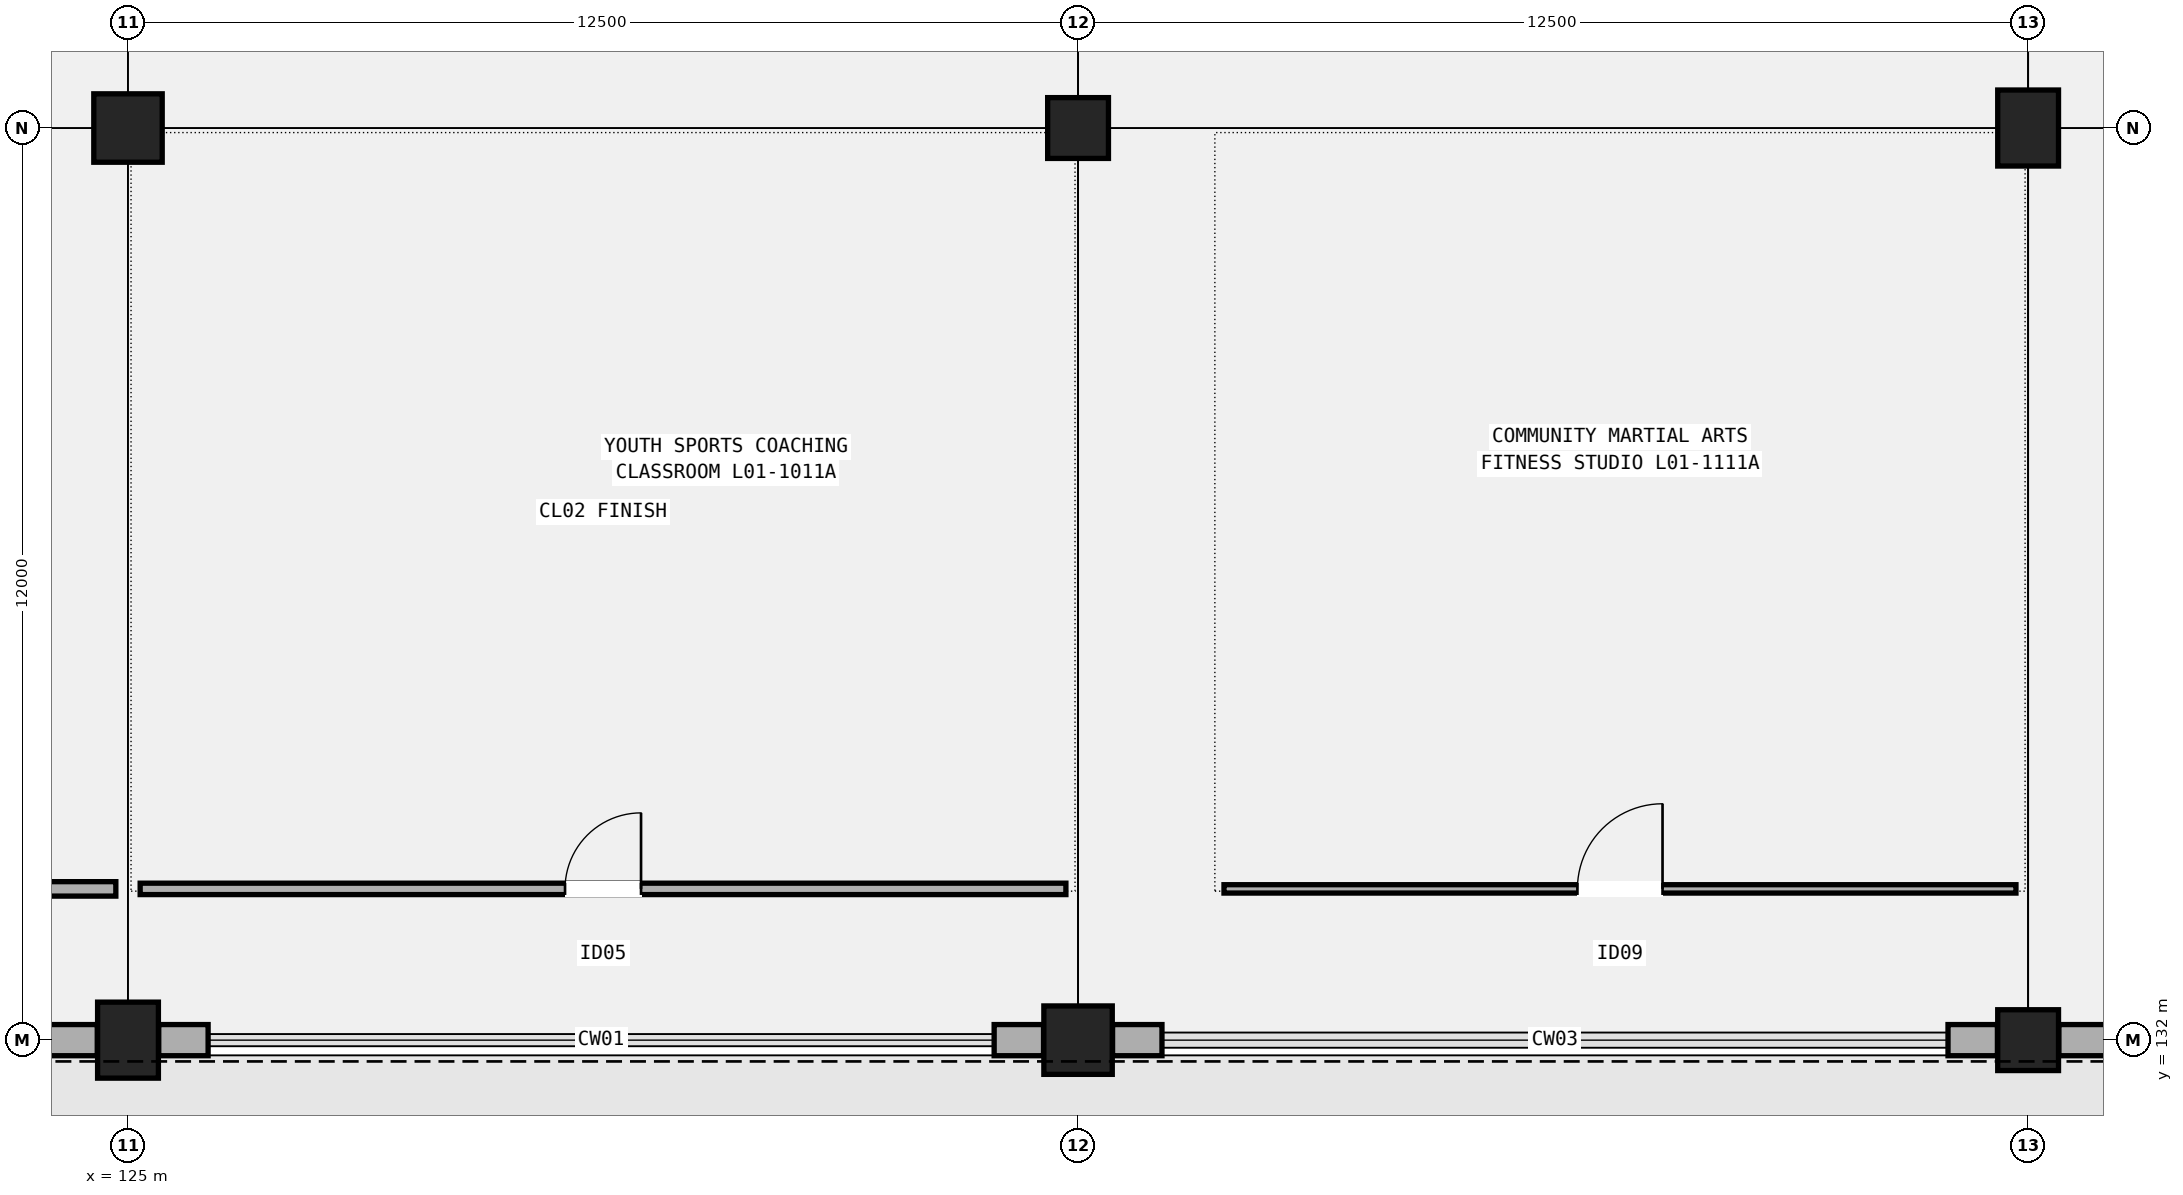
"""IFC4 building model, lengths in metres.
Left out: names, types, materials, properties, quantities, classifications, styles, units other than length and angle.
Written with IfcOpenShell. Run it as: python <this file> out.ifc"""

import sys

from ifc_helpers import new_model, si_unit, direction, frame, frame_2d, origin, origin_2d, place, context, subcontext, project, spatial, rectangle, extrude, element, fill, save


model = new_model("IFC4")
c1 = context("Model", 3, precision=1e-05, world=origin(), true_north=direction((0.0, 1.0)))
c2 = subcontext(c1, "Body", "Model", "MODEL_VIEW")
j1 = project(units=[si_unit("LENGTHUNIT", "METRE"), si_unit("PLANEANGLEUNIT", "RADIAN")], contexts=[c1])
p1 = place(None, origin())
s1 = spatial("IfcSite", under=j1, at=p1, CompositionType="ELEMENT")
p2 = place(p1, origin())
s2 = spatial("IfcBuilding", under=s1, at=p2, CompositionType="ELEMENT")
p3 = place(p2, frame((0.0, 0.0, 5.4)))
s3 = spatial("IfcBuildingStorey", under=s2, at=p3, CompositionType="ELEMENT", Elevation=5.4)
p4 = place(p3, frame((125.0, 132.0, 0.0), z_axis=(0.0, 0.0, 1.0), x_axis=(1.0, 0.0, 0.0)))
e1 = element("IfcColumn", 1, at=p4, inside=s3, PredefinedType="COLUMN", context=c2, shape_type="SweptSolid", body=[
    extrude(rectangle(XDim=0.8, YDim=1.0, at=origin_2d()), origin(), (0.0, 0.0, 1.0), 4.8),
])
for number, where, z_axis, x_axis in (
    (2, (125.0, 144.0, 0.0), (0.0, 0.0, 1.0), (1.0, 0.0, 0.0)),
    (3, (137.5, 132.0, 0.0), (0.0, 0.0, 1.0), (1.0, 0.0, 0.0)),
):
    element("IfcColumn", number, at=place(p3, frame(where, z_axis=z_axis, x_axis=x_axis)), inside=s3, PredefinedType="COLUMN", context=c2, shape_type="SweptSolid", body=[
        extrude(rectangle(XDim=0.9, YDim=0.9, at=origin_2d()), origin(), (0.0, 0.0, 1.0), 4.8),
    ])
for number, where, z_axis, x_axis in (
    (4, (137.5, 144.0, 0.0), (0.0, 0.0, 1.0), (1.0, 0.0, 0.0)),
    (5, (150.0, 132.0, 0.0), (0.0, 0.0, 1.0), (1.0, 0.0, 0.0)),
):
    element("IfcColumn", number, at=place(p3, frame(where, z_axis=z_axis, x_axis=x_axis)), inside=s3, PredefinedType="COLUMN", context=c2, shape_type="SweptSolid", body=[
        extrude(rectangle(XDim=0.8, YDim=0.8, at=origin_2d()), origin(), (0.0, 0.0, 1.0), 4.8),
    ])
p5 = place(p3, frame((150.0, 144.0, 0.0), z_axis=(0.0, 0.0, 1.0), x_axis=(1.0, 0.0, 0.0)))
e6 = element("IfcColumn", 6, at=p5, inside=s3, PredefinedType="COLUMN", context=c2, shape_type="SweptSolid", body=[
    extrude(rectangle(XDim=0.8, YDim=1.0, at=origin_2d()), origin(), (0.0, 0.0, 1.0), 4.8),
])
p6 = place(p3, frame((123.946, 132.0, 0.0), z_axis=(0.0, 0.0, 1.0), x_axis=(1.0, 0.0, 0.0)))
e7 = element("IfcWall", 7, at=p6, inside=s3, PredefinedType="SOLIDWALL", context=c2, shape_type="SweptSolid", body=[
    extrude(rectangle(XDim=0.65, YDim=0.41, at=frame_2d((0.325, 0.0))), origin(), (0.0, 0.0, 1.0), 4.15),
])
for number, where, z_axis, x_axis in (
    (8, (125.404, 132.0, 0.0), (0.0, 0.0, 1.0), (1.0, 0.0, 0.0)),
    (9, (136.396, 132.0, 0.0), (0.0, 0.0, 1.0), (1.0, 0.0, 0.0)),
):
    element("IfcWall", number, at=place(p3, frame(where, z_axis=z_axis, x_axis=x_axis)), inside=s3, PredefinedType="SOLIDWALL", context=c2, shape_type="SweptSolid", body=[
        extrude(rectangle(XDim=0.65, YDim=0.41, at=frame_2d((0.325, 0.0))), origin(), (0.0, 0.0, 1.0), 4.2),
    ])
for number, where, z_axis, x_axis in (
    (10, (137.954, 132.0, 0.0), (0.0, 0.0, 1.0), (1.0, 0.0, 0.0)),
    (11, (148.946, 132.0, 0.0), (0.0, 0.0, 1.0), (1.0, 0.0, 0.0)),
):
    element("IfcWall", number, at=place(p3, frame(where, z_axis=z_axis, x_axis=x_axis)), inside=s3, PredefinedType="SOLIDWALL", context=c2, shape_type="SweptSolid", body=[
        extrude(rectangle(XDim=0.65, YDim=0.41, at=frame_2d((0.325, 0.0))), origin(), (0.0, 0.0, 1.0), 4.15),
    ])
p7 = place(p3, frame((150.404, 132.0, 0.0), z_axis=(0.0, 0.0, 1.0), x_axis=(1.0, 0.0, 0.0)))
e12 = element("IfcWall", 12, at=p7, inside=s3, PredefinedType="SOLIDWALL", context=c2, shape_type="SweptSolid", body=[
    extrude(rectangle(XDim=0.65, YDim=0.41, at=frame_2d((0.325, 0.0))), origin(), (0.0, 0.0, 1.0), 4.2),
])
p8 = place(p3, frame((112.16, 133.99, 0.0), z_axis=(0.0, 0.0, 1.0), x_axis=(1.0, 0.0, 0.0)))
e13 = element("IfcWall", 13, at=p8, inside=s3, PredefinedType="PARTITIONING", context=c2, shape_type="SweptSolid", body=[
    extrude(rectangle(XDim=12.68, YDim=0.19, at=frame_2d((6.34, 0.0))), origin(), (0.0, 0.0, 1.0), 3.92),
])
p9 = place(p8, frame((5.865, 0.0, 0.0)))
e14 = element("IfcOpeningElement", 14, at=p9, cuts=e13, PredefinedType="OPENING", context=c2, shape_type="SweptSolid", body=[
    extrude(rectangle(XDim=0.95, YDim=2.12, at=frame_2d((0.475, 1.06))), frame((0.0, 0.105, 0.0), z_axis=(0.0, -1.0, 0.0), x_axis=(1.0, 0.0, 0.0)), (0.0, 0.0, 1.0), 0.21),
])
p10 = place(p3, frame((125.16, 133.99, 0.0), z_axis=(0.0, 0.0, 1.0), x_axis=(1.0, 0.0, 0.0)))
e15 = element("IfcWall", 15, at=p10, inside=s3, PredefinedType="PARTITIONING", context=c2, shape_type="SweptSolid", body=[
    extrude(rectangle(XDim=12.18, YDim=0.15, at=frame_2d((6.09, 0.0))), origin(), (0.0, 0.0, 1.0), 3.92),
])
p11 = place(p10, frame((5.59, 0.0, 0.0)))
e16 = element("IfcOpeningElement", 16, at=p11, cuts=e15, PredefinedType="OPENING", context=c2, shape_type="SweptSolid", body=[
    extrude(rectangle(XDim=1.0, YDim=2.14, at=frame_2d((0.5, 1.07))), frame((0.0, 0.085, 0.0), z_axis=(0.0, -1.0, 0.0), x_axis=(1.0, 0.0, 0.0)), (0.0, 0.0, 1.0), 0.17),
])
p12 = place(p3, frame((139.42, 133.99, 0.0), z_axis=(0.0, 0.0, 1.0), x_axis=(1.0, 0.0, 0.0)))
e17 = element("IfcWall", 17, at=p12, inside=s3, PredefinedType="PARTITIONING", context=c2, shape_type="SweptSolid", body=[
    extrude(rectangle(XDim=10.42, YDim=0.11, at=frame_2d((5.21, 0.0))), origin(), (0.0, 0.0, 1.0), 3.92),
])
p13 = place(p12, frame((4.65, 0.0, 0.0)))
e18 = element("IfcOpeningElement", 18, at=p13, cuts=e17, PredefinedType="OPENING", context=c2, shape_type="SweptSolid", body=[
    extrude(rectangle(XDim=1.12, YDim=2.18, at=frame_2d((0.56, 1.09))), frame((0.0, 0.065, 0.0), z_axis=(0.0, -1.0, 0.0), x_axis=(1.0, 0.0, 0.0)), (0.0, 0.0, 1.0), 0.13),
])
p14 = place(p11, origin())
e19 = element("IfcDoor", 19, at=p14, inside=s3, OperationType="SINGLE_SWING_RIGHT", PredefinedType="DOOR", context=c2, shape_type="SweptSolid", body=[
    extrude(rectangle(XDim=1.0, YDim=2.14, at=frame_2d((0.5, 1.07))), frame((0.0, 0.025, 0.0), z_axis=(0.0, -1.0, 0.0), x_axis=(1.0, 0.0, 0.0)), (0.0, 0.0, 1.0), 0.05),
])
fill(e16, e19)
p15 = place(p13, origin())
e20 = element("IfcDoor", 20, at=p15, inside=s3, OperationType="SINGLE_SWING_RIGHT", PredefinedType="DOOR", context=c2, shape_type="SweptSolid", body=[
    extrude(rectangle(XDim=1.12, YDim=2.18, at=frame_2d((0.56, 1.09))), frame((0.0, 0.025, 0.0), z_axis=(0.0, -1.0, 0.0), x_axis=(1.0, 0.0, 0.0)), (0.0, 0.0, 1.0), 0.05),
])
fill(e18, e20)
save(model, sys.argv[1])
